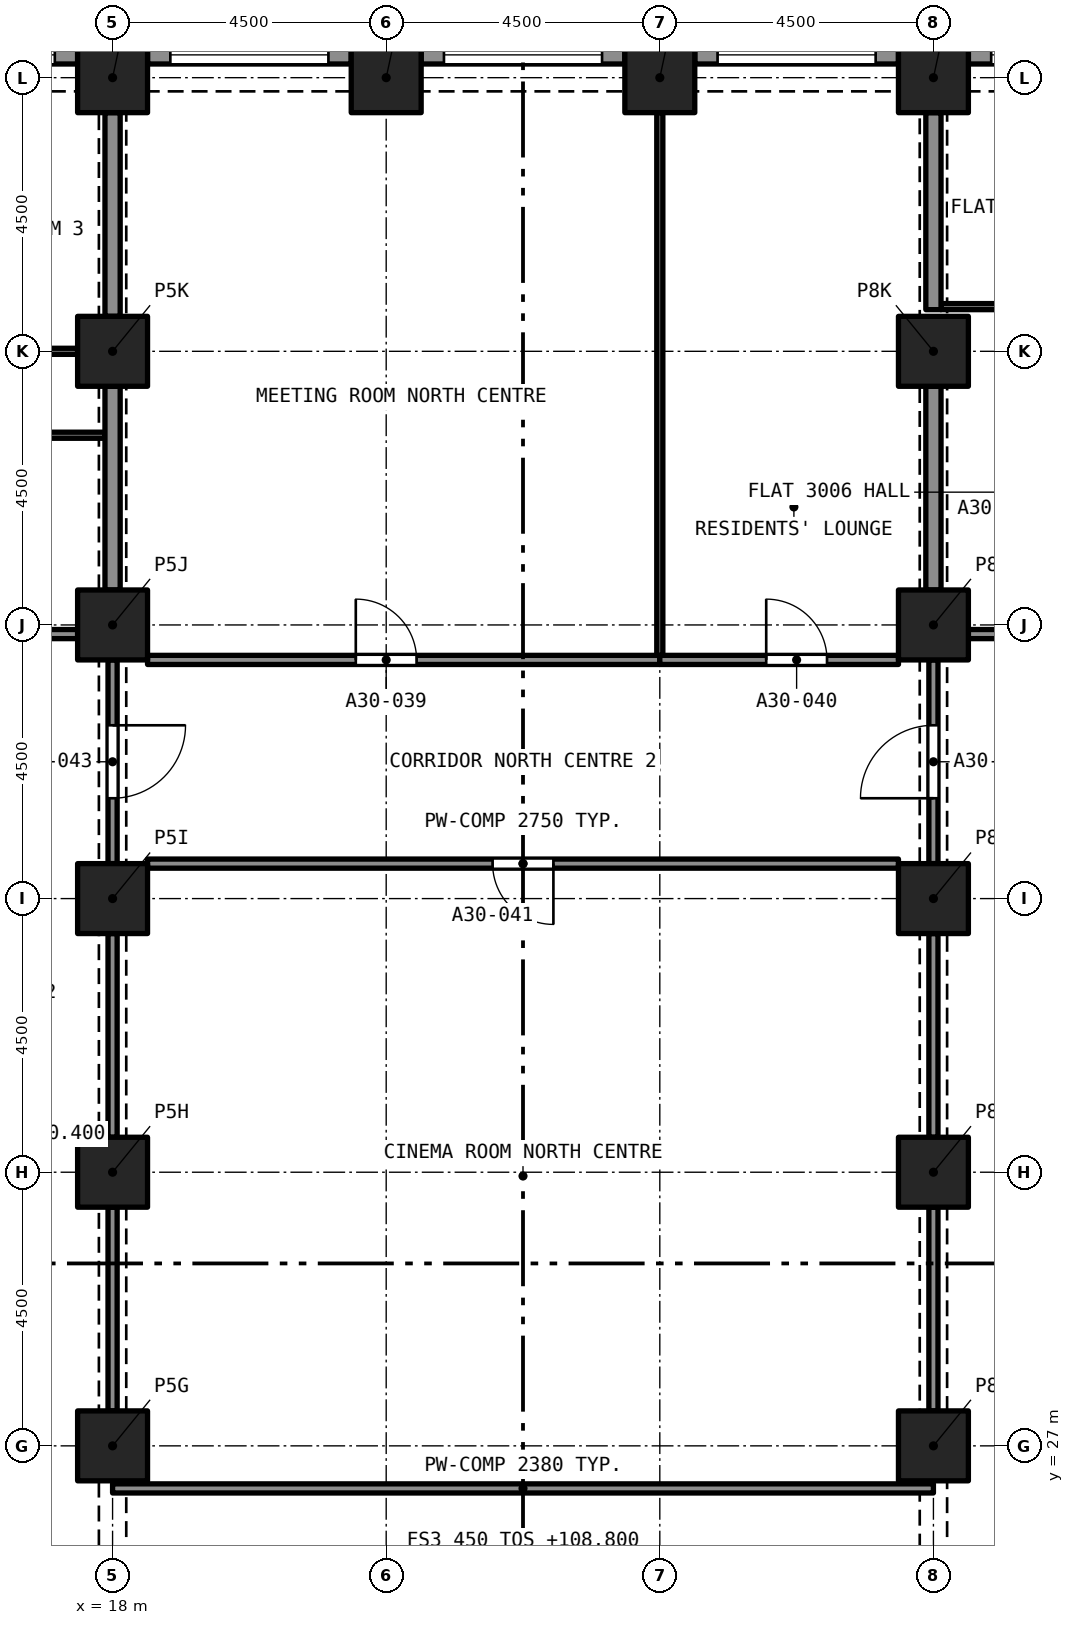
"""IFC4 building model, lengths in metres.
Left out: names, types, materials, properties, quantities, classifications, styles, units other than length and angle.
Written with IfcOpenShell. Run it as: python <this file> out.ifc"""

import sys

from ifc_helpers import new_model, si_unit, direction, frame, frame_2d, origin, origin_2d, place, context, subcontext, project, spatial, rectangle, extrude, element, fill, save


model = new_model("IFC4")
c1 = context("Model", 3, precision=1e-05, world=origin(), true_north=direction((0.0, 1.0)))
c2 = subcontext(c1, "Body", "Model", "MODEL_VIEW")
j1 = project(units=[si_unit("LENGTHUNIT", "METRE"), si_unit("PLANEANGLEUNIT", "RADIAN")], contexts=[c1])
p1 = place(None, origin())
s1 = spatial("IfcSite", under=j1, at=p1, CompositionType="ELEMENT")
p2 = place(p1, origin())
s2 = spatial("IfcBuilding", under=s1, at=p2, CompositionType="ELEMENT")
p3 = place(p2, frame((0.0, 0.0, 108.8)))
s3 = spatial("IfcBuildingStorey", under=s2, at=p3, CompositionType="ELEMENT", Elevation=108.8)
for number, where, z_axis, x_axis in (
    (1, (18.0, 27.0, 0.0), (0.0, 0.0, 1.0), (1.0, 0.0, 0.0)),
    (2, (31.5, 27.0, 0.0), (0.0, 0.0, 1.0), (1.0, 0.0, 0.0)),
    (3, (18.0, 31.5, 0.0), (0.0, 0.0, 1.0), (1.0, 0.0, 0.0)),
    (4, (31.5, 31.5, 0.0), (0.0, 0.0, 1.0), (1.0, 0.0, 0.0)),
    (5, (18.0, 36.0, 0.0), (0.0, 0.0, 1.0), (1.0, 0.0, 0.0)),
    (6, (31.5, 36.0, 0.0), (0.0, 0.0, 1.0), (1.0, 0.0, 0.0)),
    (7, (18.0, 40.5, 0.0), (0.0, 0.0, 1.0), (1.0, 0.0, 0.0)),
    (8, (31.5, 40.5, 0.0), (0.0, 0.0, 1.0), (1.0, 0.0, 0.0)),
    (9, (18.0, 45.0, 0.0), (0.0, 0.0, 1.0), (1.0, 0.0, 0.0)),
    (10, (31.5, 45.0, 0.0), (0.0, 0.0, 1.0), (1.0, 0.0, 0.0)),
    (11, (18.0, 49.5, 0.0), (0.0, 0.0, 1.0), (1.0, 0.0, 0.0)),
    (12, (22.5, 49.5, 0.0), (0.0, 0.0, 1.0), (1.0, 0.0, 0.0)),
    (13, (27.0, 49.5, 0.0), (0.0, 0.0, 1.0), (1.0, 0.0, 0.0)),
    (14, (31.5, 49.5, 0.0), (0.0, 0.0, 1.0), (1.0, 0.0, 0.0)),
):
    element("IfcColumn", number, at=place(p3, frame(where, z_axis=z_axis, x_axis=x_axis)), inside=s3, PredefinedType="COLUMN", context=c2, shape_type="SweptSolid", body=[
        extrude(rectangle(XDim=1.15, YDim=1.15, at=origin_2d()), origin(), (0.0, 0.0, 1.0), 3.2),
    ])
p4 = place(p3, frame((32.075, 49.875, 0.0), z_axis=(0.0, 0.0, 1.0), x_axis=(1.0, 0.0, 0.0)))
e15 = element("IfcWall", 15, at=p4, inside=s3, PredefinedType="SOLIDWALL", context=c2, shape_type="SweptSolid", body=[
    extrude(rectangle(XDim=3.35, YDim=0.3, at=frame_2d((1.675, 0.0))), origin(), (0.0, 0.0, 1.0), 3.2),
])
p5 = place(p4, frame((0.375, 0.0, 0.45)))
e16 = element("IfcOpeningElement", 16, at=p5, cuts=e15, PredefinedType="OPENING", context=c2, shape_type="SweptSolid", body=[
    extrude(rectangle(XDim=2.6, YDim=1.95, at=frame_2d((1.3, 0.975))), frame((0.0, 0.16, 0.0), z_axis=(0.0, -1.0, 0.0), x_axis=(1.0, 0.0, 0.0)), (0.0, 0.0, 1.0), 0.32),
])
p6 = place(p3, frame((27.575, 49.875, 0.0), z_axis=(0.0, 0.0, 1.0), x_axis=(1.0, 0.0, 0.0)))
e17 = element("IfcWall", 17, at=p6, inside=s3, PredefinedType="SOLIDWALL", context=c2, shape_type="SweptSolid", body=[
    extrude(rectangle(XDim=3.35, YDim=0.3, at=frame_2d((1.675, 0.0))), origin(), (0.0, 0.0, 1.0), 3.2),
])
p7 = place(p6, frame((0.375, 0.0, 0.45)))
e18 = element("IfcOpeningElement", 18, at=p7, cuts=e17, PredefinedType="OPENING", context=c2, shape_type="SweptSolid", body=[
    extrude(rectangle(XDim=2.6, YDim=1.95, at=frame_2d((1.3, 0.975))), frame((0.0, 0.16, 0.0), z_axis=(0.0, -1.0, 0.0), x_axis=(1.0, 0.0, 0.0)), (0.0, 0.0, 1.0), 0.32),
])
p8 = place(p3, frame((23.075, 49.875, 0.0), z_axis=(0.0, 0.0, 1.0), x_axis=(1.0, 0.0, 0.0)))
e19 = element("IfcWall", 19, at=p8, inside=s3, PredefinedType="SOLIDWALL", context=c2, shape_type="SweptSolid", body=[
    extrude(rectangle(XDim=3.35, YDim=0.3, at=frame_2d((1.675, 0.0))), origin(), (0.0, 0.0, 1.0), 3.2),
])
p9 = place(p8, frame((0.375, 0.0, 0.45)))
e20 = element("IfcOpeningElement", 20, at=p9, cuts=e19, PredefinedType="OPENING", context=c2, shape_type="SweptSolid", body=[
    extrude(rectangle(XDim=2.6, YDim=1.95, at=frame_2d((1.3, 0.975))), frame((0.0, 0.16, 0.0), z_axis=(0.0, -1.0, 0.0), x_axis=(1.0, 0.0, 0.0)), (0.0, 0.0, 1.0), 0.32),
])
p10 = place(p3, frame((18.575, 49.875, 0.0), z_axis=(0.0, 0.0, 1.0), x_axis=(1.0, 0.0, 0.0)))
e21 = element("IfcWall", 21, at=p10, inside=s3, PredefinedType="SOLIDWALL", context=c2, shape_type="SweptSolid", body=[
    extrude(rectangle(XDim=3.35, YDim=0.3, at=frame_2d((1.675, 0.0))), origin(), (0.0, 0.0, 1.0), 3.2),
])
p11 = place(p10, frame((0.375, 0.0, 0.45)))
e22 = element("IfcOpeningElement", 22, at=p11, cuts=e21, PredefinedType="OPENING", context=c2, shape_type="SweptSolid", body=[
    extrude(rectangle(XDim=2.6, YDim=1.95, at=frame_2d((1.3, 0.975))), frame((0.0, 0.16, 0.0), z_axis=(0.0, -1.0, 0.0), x_axis=(1.0, 0.0, 0.0)), (0.0, 0.0, 1.0), 0.32),
])
p12 = place(p3, frame((14.075, 49.875, 0.0), z_axis=(0.0, 0.0, 1.0), x_axis=(1.0, 0.0, 0.0)))
e23 = element("IfcWall", 23, at=p12, inside=s3, PredefinedType="SOLIDWALL", context=c2, shape_type="SweptSolid", body=[
    extrude(rectangle(XDim=3.35, YDim=0.3, at=frame_2d((1.675, 0.0))), origin(), (0.0, 0.0, 1.0), 3.2),
])
p13 = place(p12, frame((0.375, 0.0, 0.45)))
e24 = element("IfcOpeningElement", 24, at=p13, cuts=e23, PredefinedType="OPENING", context=c2, shape_type="SweptSolid", body=[
    extrude(rectangle(XDim=2.6, YDim=1.95, at=frame_2d((1.3, 0.975))), frame((0.0, 0.16, 0.0), z_axis=(0.0, -1.0, 0.0), x_axis=(1.0, 0.0, 0.0)), (0.0, 0.0, 1.0), 0.32),
])
p14 = place(p3, frame((13.5, 45.0, 0.0), z_axis=(0.0, 0.0, 1.0), x_axis=(1.0, 0.0, 0.0)))
e25 = element("IfcWall", 25, at=p14, inside=s3, PredefinedType="PARTITIONING", context=c2, shape_type="SweptSolid", body=[
    extrude(rectangle(XDim=3.925, YDim=0.1, at=frame_2d((1.962, 0.0))), origin(), (0.0, 0.0, 1.0), 2.9),
])
p15 = place(p14, frame((1.8, 0.0, 0.0)))
e26 = element("IfcOpeningElement", 26, at=p15, cuts=e25, PredefinedType="OPENING", context=c2, shape_type="SweptSolid", body=[
    extrude(rectangle(XDim=0.9, YDim=2.1, at=frame_2d((0.45, 1.05))), frame((0.0, 0.06, 0.0), z_axis=(0.0, -1.0, 0.0), x_axis=(1.0, 0.0, 0.0)), (0.0, 0.0, 1.0), 0.12),
])
p16 = place(p3, frame((18.0, 45.575, 0.0), z_axis=(0.0, 0.0, 1.0), x_axis=(0.0, 1.0, 0.0)))
e27 = element("IfcWall", 27, at=p16, inside=s3, PredefinedType="PARTITIONING", context=c2, shape_type="SweptSolid", body=[
    extrude(rectangle(XDim=3.35, YDim=0.25, at=frame_2d((1.675, 0.0))), origin(), (0.0, 0.0, 1.0), 2.38),
])
p17 = place(p3, frame((17.875, 43.62, 0.0), z_axis=(0.0, 0.0, 1.0), x_axis=(-1.0, 0.0, 0.0)))
e28 = element("IfcWall", 28, at=p17, inside=s3, PredefinedType="PARTITIONING", context=c2, shape_type="SweptSolid", body=[
    extrude(rectangle(XDim=6.064, YDim=0.1, at=frame_2d((3.032, 0.0))), origin(), (0.0, 0.0, 1.0), 2.9),
])
p18 = place(p17, frame((2.52, 0.0, 0.0)))
e29 = element("IfcOpeningElement", 29, at=p18, cuts=e28, PredefinedType="OPENING", context=c2, shape_type="SweptSolid", body=[
    extrude(rectangle(XDim=0.9, YDim=2.1, at=frame_2d((0.45, 1.05))), frame((0.0, 0.06, 0.0), z_axis=(0.0, -1.0, 0.0), x_axis=(1.0, 0.0, 0.0)), (0.0, 0.0, 1.0), 0.12),
])
p19 = place(p3, frame((18.0, 41.075, 0.0), z_axis=(0.0, 0.0, 1.0), x_axis=(0.0, 1.0, 0.0)))
e30 = element("IfcWall", 30, at=p19, inside=s3, PredefinedType="PARTITIONING", context=c2, shape_type="SweptSolid", body=[
    extrude(rectangle(XDim=3.35, YDim=0.25, at=frame_2d((1.675, 0.0))), origin(), (0.0, 0.0, 1.0), 2.38),
])
p20 = place(p3, frame((13.35, 40.35, 0.0), z_axis=(0.0, 0.0, 1.0), x_axis=(1.0, 0.0, 0.0)))
e31 = element("IfcWall", 31, at=p20, inside=s3, PredefinedType="PARTITIONING", context=c2, shape_type="SweptSolid", body=[
    extrude(rectangle(XDim=4.075, YDim=0.15, at=frame_2d((2.038, 0.0))), origin(), (0.0, 0.0, 1.0), 2.9),
])
p21 = place(p3, frame((31.625, 45.735, 0.0), z_axis=(0.0, 0.0, 1.0), x_axis=(1.0, 0.0, 0.0)))
e32 = element("IfcWall", 32, at=p21, inside=s3, PredefinedType="PARTITIONING", context=c2, shape_type="SweptSolid", body=[
    extrude(rectangle(XDim=4.375, YDim=0.1, at=frame_2d((2.188, 0.0))), origin(), (0.0, 0.0, 1.0), 2.9),
])
p22 = place(p21, frame((1.625, 0.0, 0.0)))
e33 = element("IfcOpeningElement", 33, at=p22, cuts=e32, PredefinedType="OPENING", context=c2, shape_type="SweptSolid", body=[
    extrude(rectangle(XDim=1.0, YDim=2.1, at=frame_2d((0.5, 1.05))), frame((0.0, 0.06, 0.0), z_axis=(0.0, -1.0, 0.0), x_axis=(1.0, 0.0, 0.0)), (0.0, 0.0, 1.0), 0.12),
])
p23 = place(p3, frame((31.5, 41.075, 0.0), z_axis=(0.0, 0.0, 1.0), x_axis=(0.0, 1.0, 0.0)))
e34 = element("IfcWall", 34, at=p23, inside=s3, PredefinedType="PARTITIONING", context=c2, shape_type="SweptSolid", body=[
    extrude(rectangle(XDim=3.35, YDim=0.25, at=frame_2d((1.675, 0.0))), origin(), (0.0, 0.0, 1.0), 2.38),
])
p24 = place(p3, frame((32.075, 40.35, 0.0), z_axis=(0.0, 0.0, 1.0), x_axis=(1.0, 0.0, 0.0)))
e35 = element("IfcWall", 35, at=p24, inside=s3, PredefinedType="PARTITIONING", context=c2, shape_type="SweptSolid", body=[
    extrude(rectangle(XDim=2.425, YDim=0.15, at=frame_2d((1.212, 0.0))), origin(), (0.0, 0.0, 1.0), 2.9),
])
p25 = place(p24, frame((1.175, 0.0, 0.0)))
e36 = element("IfcOpeningElement", 36, at=p25, cuts=e35, PredefinedType="OPENING", context=c2, shape_type="SweptSolid", body=[
    extrude(rectangle(XDim=1.0, YDim=2.1, at=frame_2d((0.5, 1.05))), frame((0.0, 0.085, 0.0), z_axis=(0.0, -1.0, 0.0), x_axis=(1.0, 0.0, 0.0)), (0.0, 0.0, 1.0), 0.17),
])
p26 = place(p3, frame((31.5, 45.685, 0.0), z_axis=(0.0, 0.0, 1.0), x_axis=(0.0, 1.0, 0.0)))
e37 = element("IfcWall", 37, at=p26, inside=s3, PredefinedType="PARTITIONING", context=c2, shape_type="SweptSolid", body=[
    extrude(rectangle(XDim=3.24, YDim=0.25, at=frame_2d((1.62, 0.0))), origin(), (0.0, 0.0, 1.0), 2.38),
])
p27 = place(p3, frame((18.575, 39.925, 0.0), z_axis=(0.0, 0.0, 1.0), x_axis=(1.0, 0.0, 0.0)))
e38 = element("IfcWall", 38, at=p27, inside=s3, PredefinedType="PARTITIONING", context=c2, shape_type="SweptSolid", body=[
    extrude(rectangle(XDim=8.425, YDim=0.15, at=frame_2d((4.212, 0.0))), origin(), (0.0, 0.0, 1.0), 2.75),
])
p28 = place(p27, frame((3.425, 0.0, 0.0)))
e39 = element("IfcOpeningElement", 39, at=p28, cuts=e38, PredefinedType="OPENING", context=c2, shape_type="SweptSolid", body=[
    extrude(rectangle(XDim=1.0, YDim=2.1, at=frame_2d((0.5, 1.05))), frame((0.0, 0.085, 0.0), z_axis=(0.0, -1.0, 0.0), x_axis=(1.0, 0.0, 0.0)), (0.0, 0.0, 1.0), 0.17),
])
p29 = place(p3, frame((27.0, 39.925, 0.0), z_axis=(0.0, 0.0, 1.0), x_axis=(1.0, 0.0, 0.0)))
e40 = element("IfcWall", 40, at=p29, inside=s3, PredefinedType="PARTITIONING", context=c2, shape_type="SweptSolid", body=[
    extrude(rectangle(XDim=3.925, YDim=0.15, at=frame_2d((1.962, 0.0))), origin(), (0.0, 0.0, 1.0), 2.75),
])
p30 = place(p29, frame((1.75, 0.0, 0.0)))
e41 = element("IfcOpeningElement", 41, at=p30, cuts=e40, PredefinedType="OPENING", context=c2, shape_type="SweptSolid", body=[
    extrude(rectangle(XDim=1.0, YDim=2.1, at=frame_2d((0.5, 1.05))), frame((0.0, 0.085, 0.0), z_axis=(0.0, -1.0, 0.0), x_axis=(1.0, 0.0, 0.0)), (0.0, 0.0, 1.0), 0.17),
])
p31 = place(p3, frame((30.925, 36.575, 0.0), z_axis=(0.0, 0.0, 1.0), x_axis=(-1.0, 0.0, 0.0)))
e42 = element("IfcWall", 42, at=p31, inside=s3, PredefinedType="PARTITIONING", context=c2, shape_type="SweptSolid", body=[
    extrude(rectangle(XDim=12.35, YDim=0.15, at=frame_2d((6.175, 0.0))), origin(), (0.0, 0.0, 1.0), 2.75),
])
p32 = place(p31, frame((5.675, 0.0, 0.0)))
e43 = element("IfcOpeningElement", 43, at=p32, cuts=e42, PredefinedType="OPENING", context=c2, shape_type="SweptSolid", body=[
    extrude(rectangle(XDim=1.0, YDim=2.1, at=frame_2d((0.5, 1.05))), frame((0.0, 0.085, 0.0), z_axis=(0.0, -1.0, 0.0), x_axis=(1.0, 0.0, 0.0)), (0.0, 0.0, 1.0), 0.17),
])
p33 = place(p3, frame((31.5, 36.575, 0.0), z_axis=(0.0, 0.0, 1.0), x_axis=(0.0, 1.0, 0.0)))
e44 = element("IfcWall", 44, at=p33, inside=s3, PredefinedType="PARTITIONING", context=c2, shape_type="SweptSolid", body=[
    extrude(rectangle(XDim=3.35, YDim=0.15, at=frame_2d((1.675, 0.0))), origin(), (0.0, 0.0, 1.0), 2.38),
])
p34 = place(p33, frame((1.075, 0.0, 0.0)))
e45 = element("IfcOpeningElement", 45, at=p34, cuts=e44, PredefinedType="OPENING", context=c2, shape_type="SweptSolid", body=[
    extrude(rectangle(XDim=1.2, YDim=2.1, at=frame_2d((0.6, 1.05))), frame((0.0, 0.085, 0.0), z_axis=(0.0, -1.0, 0.0), x_axis=(1.0, 0.0, 0.0)), (0.0, 0.0, 1.0), 0.17),
])
p35 = place(p3, frame((18.0, 39.925, 0.0), z_axis=(0.0, 0.0, 1.0), x_axis=(0.0, -1.0, 0.0)))
e46 = element("IfcWall", 46, at=p35, inside=s3, PredefinedType="PARTITIONING", context=c2, shape_type="SweptSolid", body=[
    extrude(rectangle(XDim=3.35, YDim=0.15, at=frame_2d((1.675, 0.0))), origin(), (0.0, 0.0, 1.0), 2.38),
])
p36 = place(p35, frame((1.075, 0.0, 0.0)))
e47 = element("IfcOpeningElement", 47, at=p36, cuts=e46, PredefinedType="OPENING", context=c2, shape_type="SweptSolid", body=[
    extrude(rectangle(XDim=1.2, YDim=2.1, at=frame_2d((0.6, 1.05))), frame((0.0, 0.085, 0.0), z_axis=(0.0, -1.0, 0.0), x_axis=(1.0, 0.0, 0.0)), (0.0, 0.0, 1.0), 0.17),
])
p37 = place(p3, frame((27.0, 40.0, 0.0), z_axis=(0.0, 0.0, 1.0), x_axis=(0.0, 1.0, 0.0)))
e48 = element("IfcWall", 48, at=p37, inside=s3, PredefinedType="PARTITIONING", context=c2, shape_type="SweptSolid", body=[
    extrude(rectangle(XDim=8.925, YDim=0.1, at=frame_2d((4.462, 0.0))), origin(), (0.0, 0.0, 1.0), 2.75),
])
for number, where, z_axis, x_axis in (
    (49, (31.5, 32.075, 0.0), (0.0, 0.0, 1.0), (0.0, 1.0, 0.0)),
    (50, (31.5, 27.575, 0.0), (0.0, 0.0, 1.0), (0.0, 1.0, 0.0)),
    (51, (18.0, 27.575, 0.0), (0.0, 0.0, 1.0), (0.0, 1.0, 0.0)),
    (52, (18.0, 32.075, 0.0), (0.0, 0.0, 1.0), (0.0, 1.0, 0.0)),
):
    element("IfcWall", number, at=place(p3, frame(where, z_axis=z_axis, x_axis=x_axis)), inside=s3, PredefinedType="PARTITIONING", context=c2, shape_type="SweptSolid", body=[
        extrude(rectangle(XDim=3.35, YDim=0.15, at=frame_2d((1.675, 0.0))), origin(), (0.0, 0.0, 1.0), 2.38),
    ])
p38 = place(p3, frame((18.0, 26.3, 0.0), z_axis=(0.0, 0.0, 1.0), x_axis=(1.0, 0.0, 0.0)))
e53 = element("IfcWall", 53, at=p38, inside=s3, PredefinedType="PARTITIONING", context=c2, shape_type="SweptSolid", body=[
    extrude(rectangle(XDim=13.5, YDim=0.15, at=frame_2d((6.75, 0.0))), origin(), (0.0, 0.0, 1.0), 2.38),
])
p39 = place(p5, origin())
e54 = element("IfcWindow", 54, at=p39, inside=s3, PartitioningType="SINGLE_PANEL", PredefinedType="WINDOW", context=c2, shape_type="SweptSolid", body=[
    extrude(rectangle(XDim=2.6, YDim=1.95, at=frame_2d((1.3, 0.975))), frame((0.0, 0.03, 0.0), z_axis=(0.0, -1.0, 0.0), x_axis=(1.0, 0.0, 0.0)), (0.0, 0.0, 1.0), 0.06),
])
fill(e16, e54)
p40 = place(p7, origin())
e55 = element("IfcWindow", 55, at=p40, inside=s3, PartitioningType="SINGLE_PANEL", PredefinedType="WINDOW", context=c2, shape_type="SweptSolid", body=[
    extrude(rectangle(XDim=2.6, YDim=1.95, at=frame_2d((1.3, 0.975))), frame((0.0, 0.03, 0.0), z_axis=(0.0, -1.0, 0.0), x_axis=(1.0, 0.0, 0.0)), (0.0, 0.0, 1.0), 0.06),
])
fill(e18, e55)
p41 = place(p9, origin())
e56 = element("IfcWindow", 56, at=p41, inside=s3, PartitioningType="SINGLE_PANEL", PredefinedType="WINDOW", context=c2, shape_type="SweptSolid", body=[
    extrude(rectangle(XDim=2.6, YDim=1.95, at=frame_2d((1.3, 0.975))), frame((0.0, 0.03, 0.0), z_axis=(0.0, -1.0, 0.0), x_axis=(1.0, 0.0, 0.0)), (0.0, 0.0, 1.0), 0.06),
])
fill(e20, e56)
p42 = place(p11, origin())
e57 = element("IfcWindow", 57, at=p42, inside=s3, PartitioningType="SINGLE_PANEL", PredefinedType="WINDOW", context=c2, shape_type="SweptSolid", body=[
    extrude(rectangle(XDim=2.6, YDim=1.95, at=frame_2d((1.3, 0.975))), frame((0.0, 0.03, 0.0), z_axis=(0.0, -1.0, 0.0), x_axis=(1.0, 0.0, 0.0)), (0.0, 0.0, 1.0), 0.06),
])
fill(e22, e57)
p43 = place(p13, origin())
e58 = element("IfcWindow", 58, at=p43, inside=s3, PartitioningType="SINGLE_PANEL", PredefinedType="WINDOW", context=c2, shape_type="SweptSolid", body=[
    extrude(rectangle(XDim=2.6, YDim=1.95, at=frame_2d((1.3, 0.975))), frame((0.0, 0.03, 0.0), z_axis=(0.0, -1.0, 0.0), x_axis=(1.0, 0.0, 0.0)), (0.0, 0.0, 1.0), 0.06),
])
fill(e24, e58)
p44 = place(p28, origin())
e59 = element("IfcDoor", 59, at=p44, inside=s3, OperationType="SINGLE_SWING_LEFT", PredefinedType="DOOR", context=c2, shape_type="SweptSolid", body=[
    extrude(rectangle(XDim=1.0, YDim=2.1, at=frame_2d((0.5, 1.05))), frame((0.0, 0.025, 0.0), z_axis=(0.0, -1.0, 0.0), x_axis=(1.0, 0.0, 0.0)), (0.0, 0.0, 1.0), 0.05),
])
fill(e39, e59)
p45 = place(p30, origin())
e60 = element("IfcDoor", 60, at=p45, inside=s3, OperationType="SINGLE_SWING_RIGHT", PredefinedType="DOOR", context=c2, shape_type="SweptSolid", body=[
    extrude(rectangle(XDim=1.0, YDim=2.1, at=frame_2d((0.5, 1.05))), frame((0.0, 0.025, 0.0), z_axis=(0.0, -1.0, 0.0), x_axis=(1.0, 0.0, 0.0)), (0.0, 0.0, 1.0), 0.05),
])
fill(e41, e60)
p46 = place(p32, origin())
e61 = element("IfcDoor", 61, at=p46, inside=s3, OperationType="SINGLE_SWING_RIGHT", PredefinedType="DOOR", context=c2, shape_type="SweptSolid", body=[
    extrude(rectangle(XDim=1.0, YDim=2.1, at=frame_2d((0.5, 1.05))), frame((0.0, 0.025, 0.0), z_axis=(0.0, -1.0, 0.0), x_axis=(1.0, 0.0, 0.0)), (0.0, 0.0, 1.0), 0.05),
])
fill(e43, e61)
p47 = place(p34, origin())
e62 = element("IfcDoor", 62, at=p47, inside=s3, OperationType="SINGLE_SWING_LEFT", PredefinedType="DOOR", context=c2, shape_type="SweptSolid", body=[
    extrude(rectangle(XDim=1.2, YDim=2.1, at=frame_2d((0.6, 1.05))), frame((0.0, 0.025, 0.0), z_axis=(0.0, -1.0, 0.0), x_axis=(1.0, 0.0, 0.0)), (0.0, 0.0, 1.0), 0.05),
])
fill(e45, e62)
p48 = place(p36, origin())
e63 = element("IfcDoor", 63, at=p48, inside=s3, OperationType="SINGLE_SWING_LEFT", PredefinedType="DOOR", context=c2, shape_type="SweptSolid", body=[
    extrude(rectangle(XDim=1.2, YDim=2.1, at=frame_2d((0.6, 1.05))), frame((0.0, 0.025, 0.0), z_axis=(0.0, -1.0, 0.0), x_axis=(1.0, 0.0, 0.0)), (0.0, 0.0, 1.0), 0.05),
])
fill(e47, e63)
save(model, sys.argv[1])
